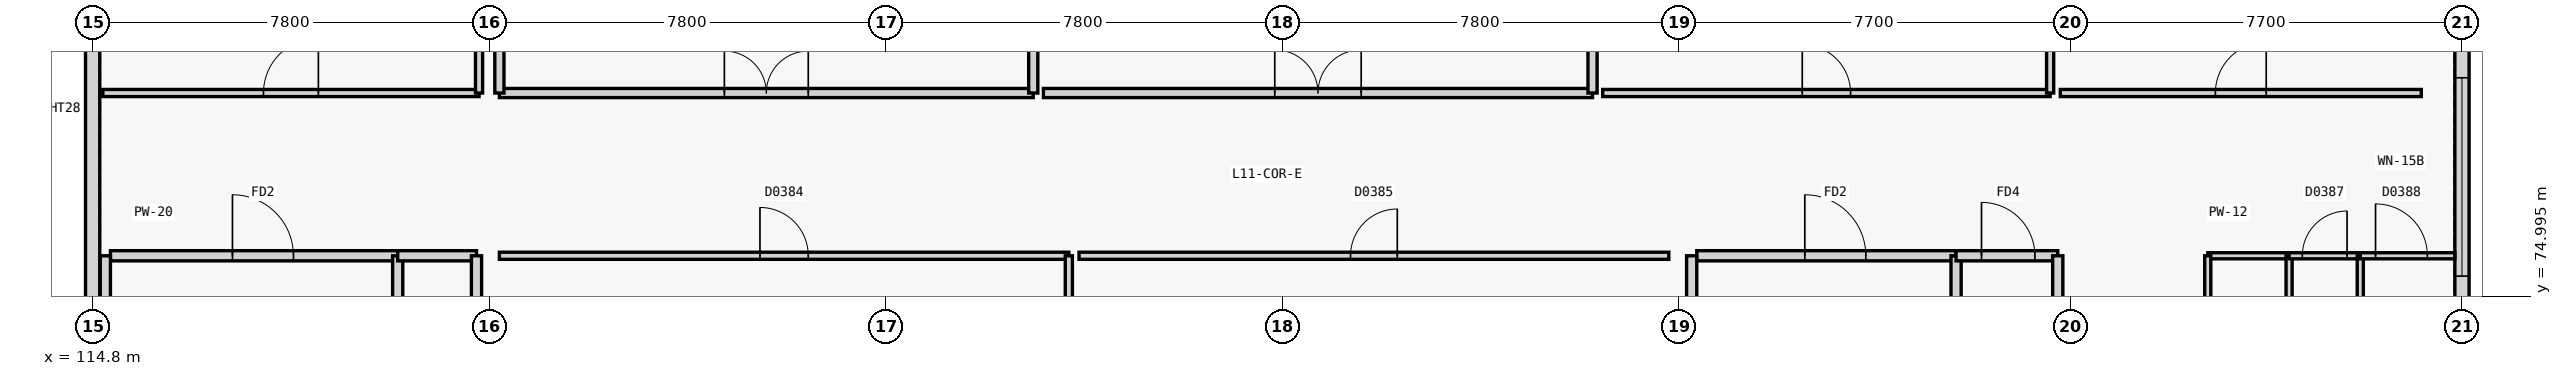
"""IFC4 building model, lengths in metres.
Left out: names, types, materials, properties, quantities, classifications, styles, units other than length and angle.
Written with IfcOpenShell. Run it as: python <this file> out.ifc"""

import sys

from ifc_helpers import new_model, si_unit, direction, frame, frame_2d, origin, place, context, subcontext, project, spatial, rectangle, extrude, element, fill, save


model = new_model("IFC4")
c1 = context("Model", 3, precision=1e-05, world=origin(), true_north=direction((0.0, 1.0)))
c2 = subcontext(c1, "Body", "Model", "MODEL_VIEW")
j1 = project(units=[si_unit("LENGTHUNIT", "METRE"), si_unit("PLANEANGLEUNIT", "RADIAN")], contexts=[c1])
p1 = place(None, origin())
s1 = spatial("IfcSite", under=j1, at=p1, CompositionType="ELEMENT")
p2 = place(p1, origin())
s2 = spatial("IfcBuilding", under=s1, at=p2, CompositionType="ELEMENT")
p3 = place(p2, frame((0.0, 0.0, 43.2)))
s3 = spatial("IfcBuildingStorey", under=s2, at=p3, CompositionType="ELEMENT", Elevation=43.2)
p4 = place(p3, frame((161.4, 96.822, 0.0), z_axis=(0.0, 0.0, 1.0), x_axis=(0.0, -1.0, 0.0)))
e1 = element("IfcWall", 1, at=p4, inside=s3, PredefinedType="SOLIDWALL", context=c2, shape_type="SweptSolid", body=[
    extrude(rectangle(XDim=32.644, YDim=0.28, at=frame_2d((16.322, 0.0))), origin(), (0.0, 0.0, 1.0), 3.06),
])
p5 = place(p4, frame((17.522, 0.0, 0.82)))
e2 = element("IfcOpeningElement", 2, at=p5, cuts=e1, PredefinedType="OPENING", context=c2, shape_type="SweptSolid", body=[
    extrude(rectangle(XDim=3.9, YDim=1.45, at=frame_2d((1.95, 0.725))), frame((0.0, 0.15, 0.0), z_axis=(0.0, -1.0, 0.0), x_axis=(1.0, 0.0, 0.0)), (0.0, 0.0, 1.0), 0.3),
])
p6 = place(p3, frame((114.8, 72.578, 0.0), z_axis=(0.0, 0.0, 1.0), x_axis=(0.0, 1.0, 0.0)))
e3 = element("IfcWall", 3, at=p6, inside=s3, PredefinedType="SOLIDWALL", context=c2, shape_type="SweptSolid", body=[
    extrude(rectangle(XDim=12.244, YDim=0.28, at=frame_2d((6.122, 0.0))), origin(), (0.0, 0.0, 1.0), 3.06),
])
p7 = place(p3, frame((115.15, 75.8, 0.0), z_axis=(0.0, 0.0, 1.0), x_axis=(1.0, 0.0, 0.0)))
e4 = element("IfcWall", 4, at=p7, inside=s3, PredefinedType="PARTITIONING", context=c2, shape_type="SweptSolid", body=[
    extrude(rectangle(XDim=5.65, YDim=0.2, at=frame_2d((2.825, 0.0))), origin(), (0.0, 0.0, 1.0), 3.62),
])
p8 = place(p7, frame((2.4, 0.0, 0.0)))
e5 = element("IfcOpeningElement", 5, at=p8, cuts=e4, PredefinedType="OPENING", context=c2, shape_type="SweptSolid", body=[
    extrude(rectangle(XDim=1.2, YDim=2.2, at=frame_2d((0.6, 1.1))), frame((0.0, 0.11, 0.0), z_axis=(0.0, -1.0, 0.0), x_axis=(1.0, 0.0, 0.0)), (0.0, 0.0, 1.0), 0.22),
])
p9 = place(p3, frame((115.05, 72.4, 0.0), z_axis=(0.0, 0.0, 1.0), x_axis=(0.0, 1.0, 0.0)))
e6 = element("IfcWall", 6, at=p9, inside=s3, PredefinedType="PARTITIONING", context=c2, shape_type="SweptSolid", body=[
    extrude(rectangle(XDim=3.4, YDim=0.2, at=frame_2d((1.7, 0.0))), origin(), (0.0, 0.0, 1.0), 3.06),
])
p10 = place(p3, frame((120.8, 72.4, 0.0), z_axis=(0.0, 0.0, 1.0), x_axis=(0.0, 1.0, 0.0)))
e7 = element("IfcWall", 7, at=p10, inside=s3, PredefinedType="PARTITIONING", context=c2, shape_type="SweptSolid", body=[
    extrude(rectangle(XDim=3.4, YDim=0.2, at=frame_2d((1.7, 0.0))), origin(), (0.0, 0.0, 1.0), 3.62),
])
p11 = place(p10, frame((1.1, 0.0, 0.0)))
e8 = element("IfcOpeningElement", 8, at=p11, cuts=e7, PredefinedType="OPENING", context=c2, shape_type="SweptSolid", body=[
    extrude(rectangle(XDim=1.2, YDim=2.2, at=frame_2d((0.6, 1.1))), frame((0.0, 0.11, 0.0), z_axis=(0.0, -1.0, 0.0), x_axis=(1.0, 0.0, 0.0)), (0.0, 0.0, 1.0), 0.22),
])
p12 = place(p3, frame((120.8, 75.8, 0.0), z_axis=(0.0, 0.0, 1.0), x_axis=(1.0, 0.0, 0.0)))
e9 = element("IfcWall", 9, at=p12, inside=s3, PredefinedType="PARTITIONING", context=c2, shape_type="SweptSolid", body=[
    extrude(rectangle(XDim=1.55, YDim=0.2, at=frame_2d((0.775, 0.0))), origin(), (0.0, 0.0, 1.0), 3.62),
])
p13 = place(p3, frame((122.35, 72.4, 0.0), z_axis=(0.0, 0.0, 1.0), x_axis=(0.0, 1.0, 0.0)))
e10 = element("IfcWall", 10, at=p13, inside=s3, PredefinedType="PARTITIONING", context=c2, shape_type="SweptSolid", body=[
    extrude(rectangle(XDim=3.4, YDim=0.2, at=frame_2d((1.7, 0.0))), origin(), (0.0, 0.0, 1.0), 3.14),
])
p14 = place(p3, frame((146.35, 75.8, 0.0), z_axis=(0.0, 0.0, 1.0), x_axis=(1.0, 0.0, 0.0)))
e11 = element("IfcWall", 11, at=p14, inside=s3, PredefinedType="PARTITIONING", context=c2, shape_type="SweptSolid", body=[
    extrude(rectangle(XDim=5.1, YDim=0.2, at=frame_2d((2.55, 0.0))), origin(), (0.0, 0.0, 1.0), 3.62),
])
p15 = place(p14, frame((2.125, 0.0, 0.0)))
e12 = element("IfcOpeningElement", 12, at=p15, cuts=e11, PredefinedType="OPENING", context=c2, shape_type="SweptSolid", body=[
    extrude(rectangle(XDim=1.2, YDim=2.2, at=frame_2d((0.6, 1.1))), frame((0.0, 0.11, 0.0), z_axis=(0.0, -1.0, 0.0), x_axis=(1.0, 0.0, 0.0)), (0.0, 0.0, 1.0), 0.22),
])
p16 = place(p3, frame((146.25, 72.4, 0.0), z_axis=(0.0, 0.0, 1.0), x_axis=(0.0, 1.0, 0.0)))
e13 = element("IfcWall", 13, at=p16, inside=s3, PredefinedType="PARTITIONING", context=c2, shape_type="SweptSolid", body=[
    extrude(rectangle(XDim=3.4, YDim=0.2, at=frame_2d((1.7, 0.0))), origin(), (0.0, 0.0, 1.0), 3.14),
])
p17 = place(p3, frame((151.45, 72.4, 0.0), z_axis=(0.0, 0.0, 1.0), x_axis=(0.0, 1.0, 0.0)))
e14 = element("IfcWall", 14, at=p17, inside=s3, PredefinedType="PARTITIONING", context=c2, shape_type="SweptSolid", body=[
    extrude(rectangle(XDim=3.4, YDim=0.2, at=frame_2d((1.7, 0.0))), origin(), (0.0, 0.0, 1.0), 3.62),
])
p18 = place(p17, frame((1.1, 0.0, 0.0)))
e15 = element("IfcOpeningElement", 15, at=p18, cuts=e14, PredefinedType="OPENING", context=c2, shape_type="SweptSolid", body=[
    extrude(rectangle(XDim=1.2, YDim=2.2, at=frame_2d((0.6, 1.1))), frame((0.0, 0.11, 0.0), z_axis=(0.0, -1.0, 0.0), x_axis=(1.0, 0.0, 0.0)), (0.0, 0.0, 1.0), 0.22),
])
p19 = place(p3, frame((151.45, 75.8, 0.0), z_axis=(0.0, 0.0, 1.0), x_axis=(1.0, 0.0, 0.0)))
e16 = element("IfcWall", 16, at=p19, inside=s3, PredefinedType="PARTITIONING", context=c2, shape_type="SweptSolid", body=[
    extrude(rectangle(XDim=2.0, YDim=0.2, at=frame_2d((1.0, 0.0))), origin(), (0.0, 0.0, 1.0), 3.62),
])
p20 = place(p19, frame((0.5, 0.0, 0.0)))
e17 = element("IfcOpeningElement", 17, at=p20, cuts=e16, PredefinedType="OPENING", context=c2, shape_type="SweptSolid", body=[
    extrude(rectangle(XDim=1.05, YDim=2.15, at=frame_2d((0.525, 1.075))), frame((0.0, 0.11, 0.0), z_axis=(0.0, -1.0, 0.0), x_axis=(1.0, 0.0, 0.0)), (0.0, 0.0, 1.0), 0.22),
])
p21 = place(p3, frame((153.45, 72.4, 0.0), z_axis=(0.0, 0.0, 1.0), x_axis=(0.0, 1.0, 0.0)))
e18 = element("IfcWall", 18, at=p21, inside=s3, PredefinedType="PARTITIONING", context=c2, shape_type="SweptSolid", body=[
    extrude(rectangle(XDim=3.4, YDim=0.2, at=frame_2d((1.7, 0.0))), origin(), (0.0, 0.0, 1.0), 3.14),
])
p22 = place(p3, frame((115.0, 79.0, 0.0), z_axis=(0.0, 0.0, 1.0), x_axis=(1.0, 0.0, 0.0)))
e19 = element("IfcWall", 19, at=p22, inside=s3, PredefinedType="PARTITIONING", context=c2, shape_type="SweptSolid", body=[
    extrude(rectangle(XDim=7.4, YDim=0.14, at=frame_2d((3.7, 0.0))), origin(), (0.0, 0.0, 1.0), 3.64),
])
p23 = place(p22, frame((3.16, 0.0, 0.0)))
e20 = element("IfcOpeningElement", 20, at=p23, cuts=e19, PredefinedType="OPENING", context=c2, shape_type="SweptSolid", body=[
    extrude(rectangle(XDim=1.08, YDim=2.2, at=frame_2d((0.54, 1.1))), frame((0.0, 0.08, 0.0), z_axis=(0.0, -1.0, 0.0), x_axis=(1.0, 0.0, 0.0)), (0.0, 0.0, 1.0), 0.16),
])
p24 = place(p3, frame((122.4, 79.0, 0.0), z_axis=(0.0, 0.0, 1.0), x_axis=(0.0, 1.0, 0.0)))
e21 = element("IfcWall", 21, at=p24, inside=s3, PredefinedType="PARTITIONING", context=c2, shape_type="SweptSolid", body=[
    extrude(rectangle(XDim=5.4, YDim=0.14, at=frame_2d((2.7, 0.0))), origin(), (0.0, 0.0, 1.0), 3.14),
])
p25 = place(p3, frame((122.8, 75.8, 0.0), z_axis=(0.0, 0.0, 1.0), x_axis=(1.0, 0.0, 0.0)))
e22 = element("IfcWall", 22, at=p25, inside=s3, PredefinedType="PARTITIONING", context=c2, shape_type="SweptSolid", body=[
    extrude(rectangle(XDim=11.2, YDim=0.14, at=frame_2d((5.6, 0.0))), origin(), (0.0, 0.0, 1.0), 3.64),
])
p26 = place(p25, frame((5.125, 0.0, 0.0)))
e23 = element("IfcOpeningElement", 23, at=p26, cuts=e22, PredefinedType="OPENING", context=c2, shape_type="SweptSolid", body=[
    extrude(rectangle(XDim=0.95, YDim=2.1, at=frame_2d((0.475, 1.05))), frame((0.0, 0.08, 0.0), z_axis=(0.0, -1.0, 0.0), x_axis=(1.0, 0.0, 0.0)), (0.0, 0.0, 1.0), 0.16),
])
p27 = place(p3, frame((134.0, 65.2, 0.0), z_axis=(0.0, 0.0, 1.0), x_axis=(0.0, 1.0, 0.0)))
e24 = element("IfcWall", 24, at=p27, inside=s3, PredefinedType="PARTITIONING", context=c2, shape_type="SweptSolid", body=[
    extrude(rectangle(XDim=10.6, YDim=0.14, at=frame_2d((5.3, 0.0))), origin(), (0.0, 0.0, 1.0), 3.26),
])
p28 = place(p3, frame((134.2, 75.8, 0.0), z_axis=(0.0, 0.0, 1.0), x_axis=(1.0, 0.0, 0.0)))
e25 = element("IfcWall", 25, at=p28, inside=s3, PredefinedType="PARTITIONING", context=c2, shape_type="SweptSolid", body=[
    extrude(rectangle(XDim=11.6, YDim=0.14, at=frame_2d((5.8, 0.0))), origin(), (0.0, 0.0, 1.0), 3.64),
])
p29 = place(p28, frame((5.34, 0.0, 0.0)))
e26 = element("IfcOpeningElement", 26, at=p29, cuts=e25, PredefinedType="OPENING", context=c2, shape_type="SweptSolid", body=[
    extrude(rectangle(XDim=0.92, YDim=2.15, at=frame_2d((0.46, 1.075))), frame((0.0, 0.08, 0.0), z_axis=(0.0, -1.0, 0.0), x_axis=(1.0, 0.0, 0.0)), (0.0, 0.0, 1.0), 0.16),
])
p30 = place(p3, frame((156.4, 75.8, 0.0), z_axis=(0.0, 0.0, 1.0), x_axis=(1.0, 0.0, 0.0)))
e27 = element("IfcWall", 27, at=p30, inside=s3, PredefinedType="PARTITIONING", context=c2, shape_type="SweptSolid", body=[
    extrude(rectangle(XDim=1.6, YDim=0.12, at=frame_2d((0.8, 0.0))), origin(), (0.0, 0.0, 1.0), 3.64),
])
p31 = place(p3, frame((156.4, 70.6, 0.0), z_axis=(0.0, 0.0, 1.0), x_axis=(0.0, 1.0, 0.0)))
e28 = element("IfcWall", 28, at=p31, inside=s3, PredefinedType="PARTITIONING", context=c2, shape_type="SweptSolid", body=[
    extrude(rectangle(XDim=5.2, YDim=0.12, at=frame_2d((2.6, 0.0))), origin(), (0.0, 0.0, 1.0), 3.64),
])
p32 = place(p31, frame((2.16, 0.0, 0.0)))
e29 = element("IfcOpeningElement", 29, at=p32, cuts=e28, PredefinedType="OPENING", context=c2, shape_type="SweptSolid", body=[
    extrude(rectangle(XDim=0.88, YDim=2.1, at=frame_2d((0.44, 1.05))), frame((0.0, 0.07, 0.0), z_axis=(0.0, -1.0, 0.0), x_axis=(1.0, 0.0, 0.0)), (0.0, 0.0, 1.0), 0.14),
])
p33 = place(p3, frame((158.0, 70.6, 0.0), z_axis=(0.0, 0.0, 1.0), x_axis=(0.0, 1.0, 0.0)))
e30 = element("IfcWall", 30, at=p33, inside=s3, PredefinedType="PARTITIONING", context=c2, shape_type="SweptSolid", body=[
    extrude(rectangle(XDim=5.2, YDim=0.12, at=frame_2d((2.6, 0.0))), origin(), (0.0, 0.0, 1.0), 3.64),
])
p34 = place(p3, frame((158.0, 75.8, 0.0), z_axis=(0.0, 0.0, 1.0), x_axis=(1.0, 0.0, 0.0)))
e31 = element("IfcWall", 31, at=p34, inside=s3, PredefinedType="PARTITIONING", context=c2, shape_type="SweptSolid", body=[
    extrude(rectangle(XDim=1.4, YDim=0.12, at=frame_2d((0.7, 0.0))), origin(), (0.0, 0.0, 1.0), 3.64),
])
p35 = place(p34, frame((0.26, 0.0, 0.0)))
e32 = element("IfcOpeningElement", 32, at=p35, cuts=e31, PredefinedType="OPENING", context=c2, shape_type="SweptSolid", body=[
    extrude(rectangle(XDim=0.88, YDim=2.1, at=frame_2d((0.44, 1.05))), frame((0.0, 0.07, 0.0), z_axis=(0.0, -1.0, 0.0), x_axis=(1.0, 0.0, 0.0)), (0.0, 0.0, 1.0), 0.14),
])
p36 = place(p3, frame((159.4, 70.6, 0.0), z_axis=(0.0, 0.0, 1.0), x_axis=(0.0, 1.0, 0.0)))
e33 = element("IfcWall", 33, at=p36, inside=s3, PredefinedType="PARTITIONING", context=c2, shape_type="SweptSolid", body=[
    extrude(rectangle(XDim=5.2, YDim=0.12, at=frame_2d((2.6, 0.0))), origin(), (0.0, 0.0, 1.0), 3.64),
])
p37 = place(p3, frame((159.4, 75.8, 0.0), z_axis=(0.0, 0.0, 1.0), x_axis=(1.0, 0.0, 0.0)))
e34 = element("IfcWall", 34, at=p37, inside=s3, PredefinedType="PARTITIONING", context=c2, shape_type="SweptSolid", body=[
    extrude(rectangle(XDim=1.86, YDim=0.12, at=frame_2d((0.93, 0.0))), origin(), (0.0, 0.0, 1.0), 3.64),
])
p38 = place(p37, frame((0.3, 0.0, 0.0)))
e35 = element("IfcOpeningElement", 35, at=p38, cuts=e34, PredefinedType="OPENING", context=c2, shape_type="SweptSolid", body=[
    extrude(rectangle(XDim=1.02, YDim=2.1, at=frame_2d((0.51, 1.05))), frame((0.0, 0.07, 0.0), z_axis=(0.0, -1.0, 0.0), x_axis=(1.0, 0.0, 0.0)), (0.0, 0.0, 1.0), 0.14),
])
p39 = place(p3, frame((122.8, 79.0, 0.0), z_axis=(0.0, 0.0, 1.0), x_axis=(1.0, 0.0, 0.0)))
e36 = element("IfcWall", 36, at=p39, inside=s3, PredefinedType="PARTITIONING", context=c2, shape_type="SweptSolid", body=[
    extrude(rectangle(XDim=10.5, YDim=0.18, at=frame_2d((5.25, 0.0))), origin(), (0.0, 0.0, 1.0), 3.64),
])
p40 = place(p39, frame((4.425, 0.0, 0.0)))
e37 = element("IfcOpeningElement", 37, at=p40, cuts=e36, PredefinedType="OPENING", context=c2, shape_type="SweptSolid", body=[
    extrude(rectangle(XDim=1.65, YDim=2.3, at=frame_2d((0.825, 1.15))), frame((0.0, 0.1, 0.0), z_axis=(0.0, -1.0, 0.0), x_axis=(1.0, 0.0, 0.0)), (0.0, 0.0, 1.0), 0.2),
])
p41 = place(p3, frame((122.8, 79.0, 0.0), z_axis=(0.0, 0.0, 1.0), x_axis=(0.0, 1.0, 0.0)))
e38 = element("IfcWall", 38, at=p41, inside=s3, PredefinedType="PARTITIONING", context=c2, shape_type="SweptSolid", body=[
    extrude(rectangle(XDim=17.6, YDim=0.18, at=frame_2d((8.8, 0.0))), origin(), (0.0, 0.0, 1.0), 3.14),
])
p42 = place(p3, frame((133.3, 79.0, 0.0), z_axis=(0.0, 0.0, 1.0), x_axis=(0.0, 1.0, 0.0)))
e39 = element("IfcWall", 39, at=p42, inside=s3, PredefinedType="PARTITIONING", context=c2, shape_type="SweptSolid", body=[
    extrude(rectangle(XDim=17.6, YDim=0.18, at=frame_2d((8.8, 0.0))), origin(), (0.0, 0.0, 1.0), 3.64),
])
p43 = place(p3, frame((133.5, 79.0, 0.0), z_axis=(0.0, 0.0, 1.0), x_axis=(1.0, 0.0, 0.0)))
e40 = element("IfcWall", 40, at=p43, inside=s3, PredefinedType="PARTITIONING", context=c2, shape_type="SweptSolid", body=[
    extrude(rectangle(XDim=10.8, YDim=0.18, at=frame_2d((5.4, 0.0))), origin(), (0.0, 0.0, 1.0), 3.64),
])
p44 = place(p43, frame((4.55, 0.0, 0.0)))
e41 = element("IfcOpeningElement", 41, at=p44, cuts=e40, PredefinedType="OPENING", context=c2, shape_type="SweptSolid", body=[
    extrude(rectangle(XDim=1.7, YDim=2.25, at=frame_2d((0.85, 1.125))), frame((0.0, 0.1, 0.0), z_axis=(0.0, -1.0, 0.0), x_axis=(1.0, 0.0, 0.0)), (0.0, 0.0, 1.0), 0.2),
])
p45 = place(p3, frame((144.3, 79.0, 0.0), z_axis=(0.0, 0.0, 1.0), x_axis=(0.0, 1.0, 0.0)))
e42 = element("IfcWall", 42, at=p45, inside=s3, PredefinedType="PARTITIONING", context=c2, shape_type="SweptSolid", body=[
    extrude(rectangle(XDim=17.6, YDim=0.18, at=frame_2d((8.8, 0.0))), origin(), (0.0, 0.0, 1.0), 3.64),
])
p46 = place(p3, frame((144.5, 79.0, 0.0), z_axis=(0.0, 0.0, 1.0), x_axis=(1.0, 0.0, 0.0)))
e43 = element("IfcWall", 43, at=p46, inside=s3, PredefinedType="PARTITIONING", context=c2, shape_type="SweptSolid", body=[
    extrude(rectangle(XDim=8.8, YDim=0.14, at=frame_2d((4.4, 0.0))), origin(), (0.0, 0.0, 1.0), 3.64),
])
p47 = place(p46, frame((3.925, 0.0, 0.0)))
e44 = element("IfcOpeningElement", 44, at=p47, cuts=e43, PredefinedType="OPENING", context=c2, shape_type="SweptSolid", body=[
    extrude(rectangle(XDim=0.95, YDim=2.1, at=frame_2d((0.475, 1.05))), frame((0.0, 0.08, 0.0), z_axis=(0.0, -1.0, 0.0), x_axis=(1.0, 0.0, 0.0)), (0.0, 0.0, 1.0), 0.16),
])
p48 = place(p3, frame((153.3, 79.0, 0.0), z_axis=(0.0, 0.0, 1.0), x_axis=(0.0, 1.0, 0.0)))
e45 = element("IfcWall", 45, at=p48, inside=s3, PredefinedType="PARTITIONING", context=c2, shape_type="SweptSolid", body=[
    extrude(rectangle(XDim=17.6, YDim=0.14, at=frame_2d((8.8, 0.0))), origin(), (0.0, 0.0, 1.0), 3.64),
])
p49 = place(p3, frame((153.5, 79.0, 0.0), z_axis=(0.0, 0.0, 1.0), x_axis=(1.0, 0.0, 0.0)))
e46 = element("IfcWall", 46, at=p49, inside=s3, PredefinedType="PARTITIONING", context=c2, shape_type="SweptSolid", body=[
    extrude(rectangle(XDim=7.1, YDim=0.14, at=frame_2d((3.55, 0.0))), origin(), (0.0, 0.0, 1.0), 3.64),
])
p50 = place(p49, frame((3.05, 0.0, 0.0)))
e47 = element("IfcOpeningElement", 47, at=p50, cuts=e46, PredefinedType="OPENING", context=c2, shape_type="SweptSolid", body=[
    extrude(rectangle(XDim=1.0, YDim=2.15, at=frame_2d((0.5, 1.075))), frame((0.0, 0.08, 0.0), z_axis=(0.0, -1.0, 0.0), x_axis=(1.0, 0.0, 0.0)), (0.0, 0.0, 1.0), 0.16),
])
p51 = place(p5, origin())
e48 = element("IfcWindow", 48, at=p51, inside=s3, PartitioningType="SINGLE_PANEL", PredefinedType="WINDOW", context=c2, shape_type="SweptSolid", body=[
    extrude(rectangle(XDim=3.9, YDim=1.45, at=frame_2d((1.95, 0.725))), frame((0.0, 0.03, 0.0), z_axis=(0.0, -1.0, 0.0), x_axis=(1.0, 0.0, 0.0)), (0.0, 0.0, 1.0), 0.06),
])
fill(e2, e48)
p52 = place(p8, origin())
e49 = element("IfcDoor", 49, at=p52, inside=s3, OperationType="SINGLE_SWING_LEFT", PredefinedType="DOOR", context=c2, shape_type="SweptSolid", body=[
    extrude(rectangle(XDim=1.2, YDim=2.2, at=frame_2d((0.6, 1.1))), frame((0.0, 0.025, 0.0), z_axis=(0.0, -1.0, 0.0), x_axis=(1.0, 0.0, 0.0)), (0.0, 0.0, 1.0), 0.05),
])
fill(e5, e49)
p53 = place(p15, origin())
e50 = element("IfcDoor", 50, at=p53, inside=s3, OperationType="SINGLE_SWING_LEFT", PredefinedType="DOOR", context=c2, shape_type="SweptSolid", body=[
    extrude(rectangle(XDim=1.2, YDim=2.2, at=frame_2d((0.6, 1.1))), frame((0.0, 0.025, 0.0), z_axis=(0.0, -1.0, 0.0), x_axis=(1.0, 0.0, 0.0)), (0.0, 0.0, 1.0), 0.05),
])
fill(e12, e50)
p54 = place(p20, origin())
e51 = element("IfcDoor", 51, at=p54, inside=s3, OperationType="SINGLE_SWING_LEFT", PredefinedType="DOOR", context=c2, shape_type="SweptSolid", body=[
    extrude(rectangle(XDim=1.05, YDim=2.15, at=frame_2d((0.525, 1.075))), frame((0.0, 0.025, 0.0), z_axis=(0.0, -1.0, 0.0), x_axis=(1.0, 0.0, 0.0)), (0.0, 0.0, 1.0), 0.05),
])
fill(e17, e51)
p55 = place(p23, origin())
e52 = element("IfcDoor", 52, at=p55, inside=s3, OperationType="SINGLE_SWING_RIGHT", PredefinedType="DOOR", context=c2, shape_type="SweptSolid", body=[
    extrude(rectangle(XDim=1.08, YDim=2.2, at=frame_2d((0.54, 1.1))), frame((0.0, 0.025, 0.0), z_axis=(0.0, -1.0, 0.0), x_axis=(1.0, 0.0, 0.0)), (0.0, 0.0, 1.0), 0.05),
])
fill(e20, e52)
p56 = place(p26, origin())
e53 = element("IfcDoor", 53, at=p56, inside=s3, OperationType="SINGLE_SWING_LEFT", PredefinedType="DOOR", context=c2, shape_type="SweptSolid", body=[
    extrude(rectangle(XDim=0.95, YDim=2.1, at=frame_2d((0.475, 1.05))), frame((0.0, 0.025, 0.0), z_axis=(0.0, -1.0, 0.0), x_axis=(1.0, 0.0, 0.0)), (0.0, 0.0, 1.0), 0.05),
])
fill(e23, e53)
p57 = place(p29, origin())
e54 = element("IfcDoor", 54, at=p57, inside=s3, OperationType="SINGLE_SWING_RIGHT", PredefinedType="DOOR", context=c2, shape_type="SweptSolid", body=[
    extrude(rectangle(XDim=0.92, YDim=2.15, at=frame_2d((0.46, 1.075))), frame((0.0, 0.025, 0.0), z_axis=(0.0, -1.0, 0.0), x_axis=(1.0, 0.0, 0.0)), (0.0, 0.0, 1.0), 0.05),
])
fill(e26, e54)
p58 = place(p35, origin())
e55 = element("IfcDoor", 55, at=p58, inside=s3, OperationType="SINGLE_SWING_RIGHT", PredefinedType="DOOR", context=c2, shape_type="SweptSolid", body=[
    extrude(rectangle(XDim=0.88, YDim=2.1, at=frame_2d((0.44, 1.05))), frame((0.0, 0.025, 0.0), z_axis=(0.0, -1.0, 0.0), x_axis=(1.0, 0.0, 0.0)), (0.0, 0.0, 1.0), 0.05),
])
fill(e32, e55)
p59 = place(p38, origin())
e56 = element("IfcDoor", 56, at=p59, inside=s3, OperationType="SINGLE_SWING_LEFT", PredefinedType="DOOR", context=c2, shape_type="SweptSolid", body=[
    extrude(rectangle(XDim=1.02, YDim=2.1, at=frame_2d((0.51, 1.05))), frame((0.0, 0.025, 0.0), z_axis=(0.0, -1.0, 0.0), x_axis=(1.0, 0.0, 0.0)), (0.0, 0.0, 1.0), 0.05),
])
fill(e35, e56)
p60 = place(p40, origin())
e57 = element("IfcDoor", 57, at=p60, inside=s3, OperationType="DOUBLE_DOOR_SINGLE_SWING", PredefinedType="DOOR", context=c2, shape_type="SweptSolid", body=[
    extrude(rectangle(XDim=1.65, YDim=2.3, at=frame_2d((0.825, 1.15))), frame((0.0, 0.025, 0.0), z_axis=(0.0, -1.0, 0.0), x_axis=(1.0, 0.0, 0.0)), (0.0, 0.0, 1.0), 0.05),
])
fill(e37, e57)
p61 = place(p44, origin())
e58 = element("IfcDoor", 58, at=p61, inside=s3, OperationType="DOUBLE_DOOR_SINGLE_SWING", PredefinedType="DOOR", context=c2, shape_type="SweptSolid", body=[
    extrude(rectangle(XDim=1.7, YDim=2.25, at=frame_2d((0.85, 1.125))), frame((0.0, 0.025, 0.0), z_axis=(0.0, -1.0, 0.0), x_axis=(1.0, 0.0, 0.0)), (0.0, 0.0, 1.0), 0.05),
])
fill(e41, e58)
p62 = place(p47, origin())
e59 = element("IfcDoor", 59, at=p62, inside=s3, OperationType="SINGLE_SWING_LEFT", PredefinedType="DOOR", context=c2, shape_type="SweptSolid", body=[
    extrude(rectangle(XDim=0.95, YDim=2.1, at=frame_2d((0.475, 1.05))), frame((0.0, 0.025, 0.0), z_axis=(0.0, -1.0, 0.0), x_axis=(1.0, 0.0, 0.0)), (0.0, 0.0, 1.0), 0.05),
])
fill(e44, e59)
p63 = place(p50, origin())
e60 = element("IfcDoor", 60, at=p63, inside=s3, OperationType="SINGLE_SWING_RIGHT", PredefinedType="DOOR", context=c2, shape_type="SweptSolid", body=[
    extrude(rectangle(XDim=1.0, YDim=2.15, at=frame_2d((0.5, 1.075))), frame((0.0, 0.025, 0.0), z_axis=(0.0, -1.0, 0.0), x_axis=(1.0, 0.0, 0.0)), (0.0, 0.0, 1.0), 0.05),
])
fill(e47, e60)
save(model, sys.argv[1])
